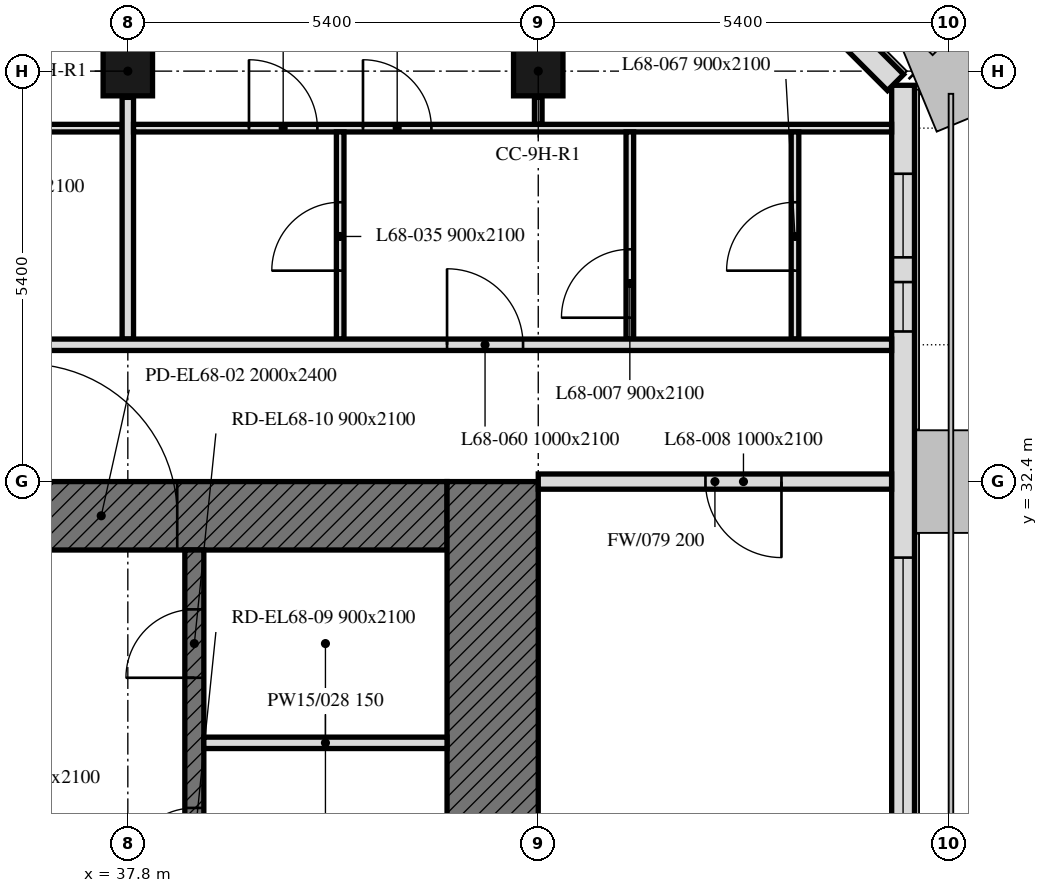
"""IFC4 building model, lengths in metres.
Left out: names, types, materials, properties, quantities, classifications, styles, units other than length and angle.
Written with IfcOpenShell. Run it as: python <this file> out.ifc"""

import sys

from ifc_helpers import new_model, si_unit, direction, frame, frame_2d, origin, origin_2d, place, context, subcontext, project, spatial, rectangle, extrude, element, fill, save


model = new_model("IFC4")
c1 = context("Model", 3, precision=1e-05, world=origin(), true_north=direction((0.0, 1.0)))
c2 = subcontext(c1, "Body", "Model", "MODEL_VIEW")
j1 = project(units=[si_unit("LENGTHUNIT", "METRE"), si_unit("PLANEANGLEUNIT", "RADIAN")], contexts=[c1])
p1 = place(None, origin())
s1 = spatial("IfcSite", under=j1, at=p1, CompositionType="ELEMENT")
p2 = place(p1, origin())
s2 = spatial("IfcBuilding", under=s1, at=p2, CompositionType="ELEMENT")
p3 = place(p2, frame((0.0, 0.0, 278.5)))
s3 = spatial("IfcBuildingStorey", under=s2, at=p3, CompositionType="ELEMENT", Elevation=278.5)
for number, where, z_axis, x_axis in (
    (1, (37.8, 37.8, 0.0), (0.0, 0.0, 1.0), (1.0, 0.0, 0.0)),
    (2, (43.2, 37.8, 0.0), (0.0, 0.0, 1.0), (1.0, 0.0, 0.0)),
):
    element("IfcColumn", number, at=place(p3, frame(where, z_axis=z_axis, x_axis=x_axis)), inside=s3, PredefinedType="COLUMN", context=c2, shape_type="SweptSolid", body=[
        extrude(rectangle(XDim=0.65, YDim=0.65, at=origin_2d()), origin(), (0.0, 0.0, 1.0), 3.0),
    ])
p4 = place(p3, frame((48.0, 5.586, 0.0), z_axis=(0.0, 0.0, 1.0), x_axis=(0.0, 1.0, 0.0)))
e3 = element("IfcWall", 3, at=p4, inside=s3, PredefinedType="SOLIDWALL", context=c2, shape_type="SweptSolid", body=[
    extrude(rectangle(XDim=32.027, YDim=0.3, at=frame_2d((16.014, 0.0))), origin(), (0.0, 0.0, 1.0), 3.0),
])
p5 = place(p4, frame((1.789, 0.0, 0.9)))
e4 = element("IfcOpeningElement", 4, at=p5, cuts=e3, PredefinedType="OPENING", context=c2, shape_type="SweptSolid", body=[
    extrude(rectangle(XDim=0.65, YDim=1.7, at=frame_2d((0.325, 0.85))), frame((0.0, 0.16, 0.0), z_axis=(0.0, -1.0, 0.0), x_axis=(1.0, 0.0, 0.0)), (0.0, 0.0, 1.0), 0.32),
])
p6 = place(p4, frame((2.764, 0.0, 0.9)))
e5 = element("IfcOpeningElement", 5, at=p6, cuts=e3, PredefinedType="OPENING", context=c2, shape_type="SweptSolid", body=[
    extrude(rectangle(XDim=1.1, YDim=1.7, at=frame_2d((0.55, 0.85))), frame((0.0, 0.16, 0.0), z_axis=(0.0, -1.0, 0.0), x_axis=(1.0, 0.0, 0.0)), (0.0, 0.0, 1.0), 0.32),
])
p7 = place(p4, frame((6.564, 0.0, 0.9)))
e6 = element("IfcOpeningElement", 6, at=p7, cuts=e3, PredefinedType="OPENING", context=c2, shape_type="SweptSolid", body=[
    extrude(rectangle(XDim=1.1, YDim=1.7, at=frame_2d((0.55, 0.85))), frame((0.0, 0.16, 0.0), z_axis=(0.0, -1.0, 0.0), x_axis=(1.0, 0.0, 0.0)), (0.0, 0.0, 1.0), 0.32),
])
p8 = place(p4, frame((7.989, 0.0, 0.9)))
e7 = element("IfcOpeningElement", 7, at=p8, cuts=e3, PredefinedType="OPENING", context=c2, shape_type="SweptSolid", body=[
    extrude(rectangle(XDim=0.65, YDim=1.7, at=frame_2d((0.325, 0.85))), frame((0.0, 0.16, 0.0), z_axis=(0.0, -1.0, 0.0), x_axis=(1.0, 0.0, 0.0)), (0.0, 0.0, 1.0), 0.32),
])
p9 = place(p4, frame((11.614, 0.0, 0.9)))
e8 = element("IfcOpeningElement", 8, at=p9, cuts=e3, PredefinedType="OPENING", context=c2, shape_type="SweptSolid", body=[
    extrude(rectangle(XDim=3.4, YDim=1.7, at=frame_2d((1.7, 0.85))), frame((0.0, 0.16, 0.0), z_axis=(0.0, -1.0, 0.0), x_axis=(1.0, 0.0, 0.0)), (0.0, 0.0, 1.0), 0.32),
])
p10 = place(p4, frame((17.364, 0.0, 0.9)))
e9 = element("IfcOpeningElement", 9, at=p10, cuts=e3, PredefinedType="OPENING", context=c2, shape_type="SweptSolid", body=[
    extrude(rectangle(XDim=1.1, YDim=1.7, at=frame_2d((0.55, 0.85))), frame((0.0, 0.16, 0.0), z_axis=(0.0, -1.0, 0.0), x_axis=(1.0, 0.0, 0.0)), (0.0, 0.0, 1.0), 0.32),
])
p11 = place(p4, frame((18.964, 0.0, 0.9)))
e10 = element("IfcOpeningElement", 10, at=p11, cuts=e3, PredefinedType="OPENING", context=c2, shape_type="SweptSolid", body=[
    extrude(rectangle(XDim=1.1, YDim=1.7, at=frame_2d((0.55, 0.85))), frame((0.0, 0.16, 0.0), z_axis=(0.0, -1.0, 0.0), x_axis=(1.0, 0.0, 0.0)), (0.0, 0.0, 1.0), 0.32),
])
p12 = place(p4, frame((22.414, 0.0, 0.9)))
e11 = element("IfcOpeningElement", 11, at=p12, cuts=e3, PredefinedType="OPENING", context=c2, shape_type="SweptSolid", body=[
    extrude(rectangle(XDim=3.4, YDim=1.7, at=frame_2d((1.7, 0.85))), frame((0.0, 0.16, 0.0), z_axis=(0.0, -1.0, 0.0), x_axis=(1.0, 0.0, 0.0)), (0.0, 0.0, 1.0), 0.32),
])
p13 = place(p4, frame((28.789, 0.0, 0.9)))
e12 = element("IfcOpeningElement", 12, at=p13, cuts=e3, PredefinedType="OPENING", context=c2, shape_type="SweptSolid", body=[
    extrude(rectangle(XDim=0.65, YDim=1.7, at=frame_2d((0.325, 0.85))), frame((0.0, 0.16, 0.0), z_axis=(0.0, -1.0, 0.0), x_axis=(1.0, 0.0, 0.0)), (0.0, 0.0, 1.0), 0.32),
])
p14 = place(p4, frame((29.764, 0.0, 0.9)))
e13 = element("IfcOpeningElement", 13, at=p14, cuts=e3, PredefinedType="OPENING", context=c2, shape_type="SweptSolid", body=[
    extrude(rectangle(XDim=1.1, YDim=1.7, at=frame_2d((0.55, 0.85))), frame((0.0, 0.16, 0.0), z_axis=(0.0, -1.0, 0.0), x_axis=(1.0, 0.0, 0.0)), (0.0, 0.0, 1.0), 0.32),
])
p15 = place(p3, frame((47.901, 37.65, 0.0), z_axis=(0.0, 0.0, 1.0), x_axis=(-0.707106781187, 0.707106781187, 0.0)))
e14 = element("IfcWall", 14, at=p15, inside=s3, PredefinedType="SOLIDWALL", context=c2, shape_type="SweptSolid", body=[
    extrude(rectangle(XDim=6.86, YDim=0.3, at=frame_2d((3.43, 0.0))), origin(), (0.0, 0.0, 1.0), 3.0),
])
p16 = place(p15, frame((1.73, 0.0, 0.9)))
e15 = element("IfcOpeningElement", 15, at=p16, cuts=e14, PredefinedType="OPENING", context=c2, shape_type="SweptSolid", body=[
    extrude(rectangle(XDim=3.4, YDim=1.7, at=frame_2d((1.7, 0.85))), frame((0.0, 0.16, 0.0), z_axis=(0.0, -1.0, 0.0), x_axis=(1.0, 0.0, 0.0)), (0.0, 0.0, 1.0), 0.32),
])
p17 = place(p3, frame((30.9, 31.95, 0.0), z_axis=(0.0, 0.0, 1.0), x_axis=(1.0, 0.0, 0.0)))
e16 = element("IfcWall", 16, at=p17, inside=s3, PredefinedType="SOLIDWALL", context=c2, shape_type="SweptSolid", body=[
    extrude(rectangle(XDim=11.1, YDim=0.9, at=frame_2d((5.55, 0.0))), origin(), (0.0, 0.0, 1.0), 3.0),
])
p18 = place(p17, frame((5.55, 0.0, 0.0)))
e17 = element("IfcOpeningElement", 17, at=p18, cuts=e16, PredefinedType="OPENING", context=c2, shape_type="SweptSolid", body=[
    extrude(rectangle(XDim=2.0, YDim=2.4, at=frame_2d((1.0, 1.2))), frame((0.0, 0.45, 0.0), z_axis=(0.0, -1.0, 0.0), x_axis=(1.0, 0.0, 0.0)), (0.0, 0.0, 1.0), 0.9),
])
p19 = place(p3, frame((42.6, 32.4, 0.0), z_axis=(0.0, 0.0, 1.0), x_axis=(0.0, -1.0, 0.0)))
e18 = element("IfcWall", 18, at=p19, inside=s3, PredefinedType="SOLIDWALL", context=c2, shape_type="SweptSolid", body=[
    extrude(rectangle(XDim=16.2, YDim=1.2, at=frame_2d((8.1, 0.0))), origin(), (0.0, 0.0, 1.0), 3.0),
])
p20 = place(p3, frame((38.675, 17.1, 0.0), z_axis=(0.0, 0.0, 1.0), x_axis=(0.0, 1.0, 0.0)))
e19 = element("IfcWall", 19, at=p20, inside=s3, PredefinedType="SOLIDWALL", context=c2, shape_type="SweptSolid", body=[
    extrude(rectangle(XDim=14.4, YDim=0.25, at=frame_2d((7.2, 0.0))), origin(), (0.0, 0.0, 1.0), 3.0),
])
p21 = place(p20, frame((4.6, 0.0, 0.0)))
e20 = element("IfcOpeningElement", 20, at=p21, cuts=e19, PredefinedType="OPENING", context=c2, shape_type="SweptSolid", body=[
    extrude(rectangle(XDim=1.0, YDim=2.1, at=frame_2d((0.5, 1.05))), frame((0.0, 0.125, 0.0), z_axis=(0.0, -1.0, 0.0), x_axis=(1.0, 0.0, 0.0)), (0.0, 0.0, 1.0), 0.25),
])
p22 = place(p20, frame((7.062, 0.0, 0.0)))
e21 = element("IfcOpeningElement", 21, at=p22, cuts=e19, PredefinedType="OPENING", context=c2, shape_type="SweptSolid", body=[
    extrude(rectangle(XDim=1.2, YDim=2.1, at=frame_2d((0.6, 1.05))), frame((0.0, 0.125, 0.0), z_axis=(0.0, -1.0, 0.0), x_axis=(1.0, 0.0, 0.0)), (0.0, 0.0, 1.0), 0.25),
])
p23 = place(p20, frame((10.106, 0.0, 0.0)))
e22 = element("IfcOpeningElement", 22, at=p23, cuts=e19, PredefinedType="OPENING", context=c2, shape_type="SweptSolid", body=[
    extrude(rectangle(XDim=0.9, YDim=2.1, at=frame_2d((0.45, 1.05))), frame((0.0, 0.125, 0.0), z_axis=(0.0, -1.0, 0.0), x_axis=(1.0, 0.0, 0.0)), (0.0, 0.0, 1.0), 0.25),
])
p24 = place(p20, frame((12.719, 0.0, 0.0)))
e23 = element("IfcOpeningElement", 23, at=p24, cuts=e19, PredefinedType="OPENING", context=c2, shape_type="SweptSolid", body=[
    extrude(rectangle(XDim=0.9, YDim=2.1, at=frame_2d((0.45, 1.05))), frame((0.0, 0.125, 0.0), z_axis=(0.0, -1.0, 0.0), x_axis=(1.0, 0.0, 0.0)), (0.0, 0.0, 1.0), 0.25),
])
p25 = place(p3, frame((38.8, 28.963, 0.0), z_axis=(0.0, 0.0, 1.0), x_axis=(1.0, 0.0, 0.0)))
e24 = element("IfcWall", 24, at=p25, inside=s3, PredefinedType="PARTITIONING", context=c2, shape_type="SweptSolid", body=[
    extrude(rectangle(XDim=3.2, YDim=0.15, at=frame_2d((1.6, 0.0))), origin(), (0.0, 0.0, 1.0), 3.0),
])
p26 = place(p3, frame((27.075, 37.05, 0.0), z_axis=(0.0, 0.0, 1.0), x_axis=(1.0, 0.0, 0.0)))
e25 = element("IfcWall", 25, at=p26, inside=s3, PredefinedType="PARTITIONING", context=c2, shape_type="SweptSolid", body=[
    extrude(rectangle(XDim=10.65, YDim=0.1, at=frame_2d((5.325, 0.0))), origin(), (0.0, 0.0, 1.0), 3.0),
])
p27 = place(p26, frame((7.946, 0.0, 0.0)))
e26 = element("IfcOpeningElement", 26, at=p27, cuts=e25, PredefinedType="OPENING", context=c2, shape_type="SweptSolid", body=[
    extrude(rectangle(XDim=0.9, YDim=2.1, at=frame_2d((0.45, 1.05))), frame((0.0, 0.05, 0.0), z_axis=(0.0, -1.0, 0.0), x_axis=(1.0, 0.0, 0.0)), (0.0, 0.0, 1.0), 0.1),
])
p28 = place(p26, frame((1.46, 0.0, 0.0)))
e27 = element("IfcOpeningElement", 27, at=p28, cuts=e25, PredefinedType="OPENING", context=c2, shape_type="SweptSolid", body=[
    extrude(rectangle(XDim=0.9, YDim=2.1, at=frame_2d((0.45, 1.05))), frame((0.0, 0.05, 0.0), z_axis=(0.0, -1.0, 0.0), x_axis=(1.0, 0.0, 0.0)), (0.0, 0.0, 1.0), 0.1),
])
p29 = place(p26, frame((2.96, 0.0, 0.0)))
e28 = element("IfcOpeningElement", 28, at=p29, cuts=e25, PredefinedType="OPENING", context=c2, shape_type="SweptSolid", body=[
    extrude(rectangle(XDim=0.9, YDim=2.1, at=frame_2d((0.45, 1.05))), frame((0.0, 0.05, 0.0), z_axis=(0.0, -1.0, 0.0), x_axis=(1.0, 0.0, 0.0)), (0.0, 0.0, 1.0), 0.1),
])
p30 = place(p3, frame((37.8, 34.275, 0.0), z_axis=(0.0, 0.0, 1.0), x_axis=(0.0, 1.0, 0.0)))
e29 = element("IfcWall", 29, at=p30, inside=s3, PredefinedType="PARTITIONING", context=c2, shape_type="SweptSolid", body=[
    extrude(rectangle(XDim=3.18, YDim=0.15, at=frame_2d((1.59, 0.0))), origin(), (0.0, 0.0, 1.0), 3.0),
])
p31 = place(p3, frame((43.2, 37.1, 0.0), z_axis=(0.0, 0.0, 1.0), x_axis=(0.0, 1.0, 0.0)))
e30 = element("IfcWall", 30, at=p31, inside=s3, PredefinedType="PARTITIONING", context=c2, shape_type="SweptSolid", body=[
    extrude(rectangle(XDim=0.355, YDim=0.1, at=frame_2d((0.177, 0.0))), origin(), (0.0, 0.0, 1.0), 3.0),
])
p32 = place(p3, frame((37.875, 37.05, 0.0), z_axis=(0.0, 0.0, 1.0), x_axis=(1.0, 0.0, 0.0)))
e31 = element("IfcWall", 31, at=p32, inside=s3, PredefinedType="PARTITIONING", context=c2, shape_type="SweptSolid", body=[
    extrude(rectangle(XDim=9.974, YDim=0.1, at=frame_2d((4.987, 0.0))), origin(), (0.0, 0.0, 1.0), 3.0),
])
p33 = place(p32, frame((1.519, 0.0, 0.0)))
e32 = element("IfcOpeningElement", 32, at=p33, cuts=e31, PredefinedType="OPENING", context=c2, shape_type="SweptSolid", body=[
    extrude(rectangle(XDim=0.9, YDim=2.1, at=frame_2d((0.45, 1.05))), frame((0.0, 0.05, 0.0), z_axis=(0.0, -1.0, 0.0), x_axis=(1.0, 0.0, 0.0)), (0.0, 0.0, 1.0), 0.1),
])
p34 = place(p32, frame((3.019, 0.0, 0.0)))
e33 = element("IfcOpeningElement", 33, at=p34, cuts=e31, PredefinedType="OPENING", context=c2, shape_type="SweptSolid", body=[
    extrude(rectangle(XDim=0.9, YDim=2.1, at=frame_2d((0.45, 1.05))), frame((0.0, 0.05, 0.0), z_axis=(0.0, -1.0, 0.0), x_axis=(1.0, 0.0, 0.0)), (0.0, 0.0, 1.0), 0.1),
])
p35 = place(p3, frame((40.594, 34.275, 0.0), z_axis=(0.0, 0.0, 1.0), x_axis=(0.0, 1.0, 0.0)))
e34 = element("IfcWall", 34, at=p35, inside=s3, PredefinedType="PARTITIONING", context=c2, shape_type="SweptSolid", body=[
    extrude(rectangle(XDim=2.725, YDim=0.1, at=frame_2d((1.363, 0.0))), origin(), (0.0, 0.0, 1.0), 3.0),
])
p36 = place(p35, frame((0.9, 0.0, 0.0)))
e35 = element("IfcOpeningElement", 35, at=p36, cuts=e34, PredefinedType="OPENING", context=c2, shape_type="SweptSolid", body=[
    extrude(rectangle(XDim=0.9, YDim=2.1, at=frame_2d((0.45, 1.05))), frame((0.0, 0.05, 0.0), z_axis=(0.0, -1.0, 0.0), x_axis=(1.0, 0.0, 0.0)), (0.0, 0.0, 1.0), 0.1),
])
p37 = place(p3, frame((44.405, 34.275, 0.0), z_axis=(0.0, 0.0, 1.0), x_axis=(0.0, 1.0, 0.0)))
e36 = element("IfcWall", 36, at=p37, inside=s3, PredefinedType="PARTITIONING", context=c2, shape_type="SweptSolid", body=[
    extrude(rectangle(XDim=2.725, YDim=0.1, at=frame_2d((1.363, 0.0))), origin(), (0.0, 0.0, 1.0), 3.0),
])
p38 = place(p37, frame((0.281, 0.0, 0.0)))
e37 = element("IfcOpeningElement", 37, at=p38, cuts=e36, PredefinedType="OPENING", context=c2, shape_type="SweptSolid", body=[
    extrude(rectangle(XDim=0.9, YDim=2.1, at=frame_2d((0.45, 1.05))), frame((0.0, 0.05, 0.0), z_axis=(0.0, -1.0, 0.0), x_axis=(1.0, 0.0, 0.0)), (0.0, 0.0, 1.0), 0.1),
])
p39 = place(p3, frame((46.578, 34.275, 0.0), z_axis=(0.0, 0.0, 1.0), x_axis=(0.0, 1.0, 0.0)))
e38 = element("IfcWall", 38, at=p39, inside=s3, PredefinedType="PARTITIONING", context=c2, shape_type="SweptSolid", body=[
    extrude(rectangle(XDim=2.725, YDim=0.1, at=frame_2d((1.363, 0.0))), origin(), (0.0, 0.0, 1.0), 3.0),
])
p40 = place(p39, frame((0.9, 0.0, 0.0)))
e39 = element("IfcOpeningElement", 39, at=p40, cuts=e38, PredefinedType="OPENING", context=c2, shape_type="SweptSolid", body=[
    extrude(rectangle(XDim=0.9, YDim=2.1, at=frame_2d((0.45, 1.05))), frame((0.0, 0.05, 0.0), z_axis=(0.0, -1.0, 0.0), x_axis=(1.0, 0.0, 0.0)), (0.0, 0.0, 1.0), 0.1),
])
p41 = place(p3, frame((6.151, 34.2, 0.0), z_axis=(0.0, 0.0, 1.0), x_axis=(1.0, 0.0, 0.0)))
e40 = element("IfcWall", 40, at=p41, inside=s3, PredefinedType="PARTITIONING", context=c2, shape_type="SweptSolid", body=[
    extrude(rectangle(XDim=41.698, YDim=0.15, at=frame_2d((20.849, 0.0))), origin(), (0.0, 0.0, 1.0), 3.0),
])
p42 = place(p41, frame((3.369, 0.0, 0.0)))
e41 = element("IfcOpeningElement", 41, at=p42, cuts=e40, PredefinedType="OPENING", context=c2, shape_type="SweptSolid", body=[
    extrude(rectangle(XDim=1.0, YDim=2.1, at=frame_2d((0.5, 1.05))), frame((0.0, 0.075, 0.0), z_axis=(0.0, -1.0, 0.0), x_axis=(1.0, 0.0, 0.0)), (0.0, 0.0, 1.0), 0.15),
])
p43 = place(p41, frame((12.483, 0.0, 0.0)))
e42 = element("IfcOpeningElement", 42, at=p43, cuts=e40, PredefinedType="OPENING", context=c2, shape_type="SweptSolid", body=[
    extrude(rectangle(XDim=1.0, YDim=2.1, at=frame_2d((0.5, 1.05))), frame((0.0, 0.075, 0.0), z_axis=(0.0, -1.0, 0.0), x_axis=(1.0, 0.0, 0.0)), (0.0, 0.0, 1.0), 0.15),
])
p44 = place(p41, frame((24.572, 0.0, 0.0)))
e43 = element("IfcOpeningElement", 43, at=p44, cuts=e40, PredefinedType="OPENING", context=c2, shape_type="SweptSolid", body=[
    extrude(rectangle(XDim=1.0, YDim=2.1, at=frame_2d((0.5, 1.05))), frame((0.0, 0.075, 0.0), z_axis=(0.0, -1.0, 0.0), x_axis=(1.0, 0.0, 0.0)), (0.0, 0.0, 1.0), 0.15),
])
p45 = place(p41, frame((35.849, 0.0, 0.0)))
e44 = element("IfcOpeningElement", 44, at=p45, cuts=e40, PredefinedType="OPENING", context=c2, shape_type="SweptSolid", body=[
    extrude(rectangle(XDim=1.0, YDim=2.1, at=frame_2d((0.5, 1.05))), frame((0.0, 0.075, 0.0), z_axis=(0.0, -1.0, 0.0), x_axis=(1.0, 0.0, 0.0)), (0.0, 0.0, 1.0), 0.15),
])
p46 = place(p3, frame((47.849, 32.4, 0.0), z_axis=(0.0, 0.0, 1.0), x_axis=(-1.0, 0.0, 0.0)))
e45 = element("IfcWall", 45, at=p46, inside=s3, PredefinedType="PARTITIONING", context=c2, shape_type="SweptSolid", body=[
    extrude(rectangle(XDim=4.649, YDim=0.2, at=frame_2d((2.325, 0.0))), origin(), (0.0, 0.0, 1.0), 2.4),
])
p47 = place(p46, frame((1.449, 0.0, 0.0)))
e46 = element("IfcOpeningElement", 46, at=p47, cuts=e45, PredefinedType="OPENING", context=c2, shape_type="SweptSolid", body=[
    extrude(rectangle(XDim=1.0, YDim=2.1, at=frame_2d((0.5, 1.05))), frame((0.0, 0.1, 0.0), z_axis=(0.0, -1.0, 0.0), x_axis=(1.0, 0.0, 0.0)), (0.0, 0.0, 1.0), 0.2),
])
p48 = place(p12, origin())
e47 = element("IfcWindow", 47, at=p48, inside=s3, PartitioningType="SINGLE_PANEL", PredefinedType="WINDOW", context=c2, shape_type="SweptSolid", body=[
    extrude(rectangle(XDim=3.4, YDim=1.7, at=frame_2d((1.7, 0.85))), frame((0.0, 0.03, 0.0), z_axis=(0.0, -1.0, 0.0), x_axis=(1.0, 0.0, 0.0)), (0.0, 0.0, 1.0), 0.06),
])
fill(e11, e47)
p49 = place(p13, origin())
e48 = element("IfcWindow", 48, at=p49, inside=s3, PartitioningType="SINGLE_PANEL", PredefinedType="WINDOW", context=c2, shape_type="SweptSolid", body=[
    extrude(rectangle(XDim=0.65, YDim=1.7, at=frame_2d((0.325, 0.85))), frame((0.0, 0.03, 0.0), z_axis=(0.0, -1.0, 0.0), x_axis=(1.0, 0.0, 0.0)), (0.0, 0.0, 1.0), 0.06),
])
fill(e12, e48)
p50 = place(p14, origin())
e49 = element("IfcWindow", 49, at=p50, inside=s3, PartitioningType="SINGLE_PANEL", PredefinedType="WINDOW", context=c2, shape_type="SweptSolid", body=[
    extrude(rectangle(XDim=1.1, YDim=1.7, at=frame_2d((0.55, 0.85))), frame((0.0, 0.03, 0.0), z_axis=(0.0, -1.0, 0.0), x_axis=(1.0, 0.0, 0.0)), (0.0, 0.0, 1.0), 0.06),
])
fill(e13, e49)
p51 = place(p18, origin())
e50 = element("IfcDoor", 50, at=p51, inside=s3, OperationType="DOUBLE_DOOR_SINGLE_SWING", PredefinedType="DOOR", context=c2, shape_type="SweptSolid", body=[
    extrude(rectangle(XDim=2.0, YDim=2.4, at=frame_2d((1.0, 1.2))), frame((0.0, 0.025, 0.0), z_axis=(0.0, -1.0, 0.0), x_axis=(1.0, 0.0, 0.0)), (0.0, 0.0, 1.0), 0.05),
])
fill(e17, e50)
p52 = place(p23, origin())
e51 = element("IfcDoor", 51, at=p52, inside=s3, OperationType="SINGLE_SWING_LEFT", PredefinedType="DOOR", context=c2, shape_type="SweptSolid", body=[
    extrude(rectangle(XDim=0.9, YDim=2.1, at=frame_2d((0.45, 1.05))), frame((0.0, 0.025, 0.0), z_axis=(0.0, -1.0, 0.0), x_axis=(1.0, 0.0, 0.0)), (0.0, 0.0, 1.0), 0.05),
])
fill(e22, e51)
p53 = place(p24, origin())
e52 = element("IfcDoor", 52, at=p53, inside=s3, OperationType="SINGLE_SWING_LEFT", PredefinedType="DOOR", context=c2, shape_type="SweptSolid", body=[
    extrude(rectangle(XDim=0.9, YDim=2.1, at=frame_2d((0.45, 1.05))), frame((0.0, 0.025, 0.0), z_axis=(0.0, -1.0, 0.0), x_axis=(1.0, 0.0, 0.0)), (0.0, 0.0, 1.0), 0.05),
])
fill(e23, e52)
p54 = place(p38, origin())
e53 = element("IfcDoor", 53, at=p54, inside=s3, OperationType="SINGLE_SWING_RIGHT", PredefinedType="DOOR", context=c2, shape_type="SweptSolid", body=[
    extrude(rectangle(XDim=0.9, YDim=2.1, at=frame_2d((0.45, 1.05))), frame((0.0, 0.025, 0.0), z_axis=(0.0, -1.0, 0.0), x_axis=(1.0, 0.0, 0.0)), (0.0, 0.0, 1.0), 0.05),
])
fill(e37, e53)
p55 = place(p47, origin())
e54 = element("IfcDoor", 54, at=p55, inside=s3, OperationType="SINGLE_SWING_LEFT", PredefinedType="DOOR", context=c2, shape_type="SweptSolid", body=[
    extrude(rectangle(XDim=1.0, YDim=2.1, at=frame_2d((0.5, 1.05))), frame((0.0, 0.025, 0.0), z_axis=(0.0, -1.0, 0.0), x_axis=(1.0, 0.0, 0.0)), (0.0, 0.0, 1.0), 0.05),
])
fill(e46, e54)
p56 = place(p33, origin())
e55 = element("IfcDoor", 55, at=p56, inside=s3, OperationType="SINGLE_SWING_LEFT", PredefinedType="DOOR", context=c2, shape_type="SweptSolid", body=[
    extrude(rectangle(XDim=0.9, YDim=2.1, at=frame_2d((0.45, 1.05))), frame((0.0, 0.025, 0.0), z_axis=(0.0, -1.0, 0.0), x_axis=(1.0, 0.0, 0.0)), (0.0, 0.0, 1.0), 0.05),
])
fill(e32, e55)
p57 = place(p36, origin())
e56 = element("IfcDoor", 56, at=p57, inside=s3, OperationType="SINGLE_SWING_RIGHT", PredefinedType="DOOR", context=c2, shape_type="SweptSolid", body=[
    extrude(rectangle(XDim=0.9, YDim=2.1, at=frame_2d((0.45, 1.05))), frame((0.0, 0.025, 0.0), z_axis=(0.0, -1.0, 0.0), x_axis=(1.0, 0.0, 0.0)), (0.0, 0.0, 1.0), 0.05),
])
fill(e35, e56)
p58 = place(p34, origin())
e57 = element("IfcDoor", 57, at=p58, inside=s3, OperationType="SINGLE_SWING_RIGHT", PredefinedType="DOOR", context=c2, shape_type="SweptSolid", body=[
    extrude(rectangle(XDim=0.9, YDim=2.1, at=frame_2d((0.45, 1.05))), frame((0.0, 0.025, 0.0), z_axis=(0.0, -1.0, 0.0), x_axis=(1.0, 0.0, 0.0)), (0.0, 0.0, 1.0), 0.05),
])
fill(e33, e57)
p59 = place(p45, origin())
e58 = element("IfcDoor", 58, at=p59, inside=s3, OperationType="SINGLE_SWING_LEFT", PredefinedType="DOOR", context=c2, shape_type="SweptSolid", body=[
    extrude(rectangle(XDim=1.0, YDim=2.1, at=frame_2d((0.5, 1.05))), frame((0.0, 0.025, 0.0), z_axis=(0.0, -1.0, 0.0), x_axis=(1.0, 0.0, 0.0)), (0.0, 0.0, 1.0), 0.05),
])
fill(e44, e58)
p60 = place(p40, origin())
e59 = element("IfcDoor", 59, at=p60, inside=s3, OperationType="SINGLE_SWING_LEFT", PredefinedType="DOOR", context=c2, shape_type="SweptSolid", body=[
    extrude(rectangle(XDim=0.9, YDim=2.1, at=frame_2d((0.45, 1.05))), frame((0.0, 0.025, 0.0), z_axis=(0.0, -1.0, 0.0), x_axis=(1.0, 0.0, 0.0)), (0.0, 0.0, 1.0), 0.05),
])
fill(e39, e59)
save(model, sys.argv[1])
